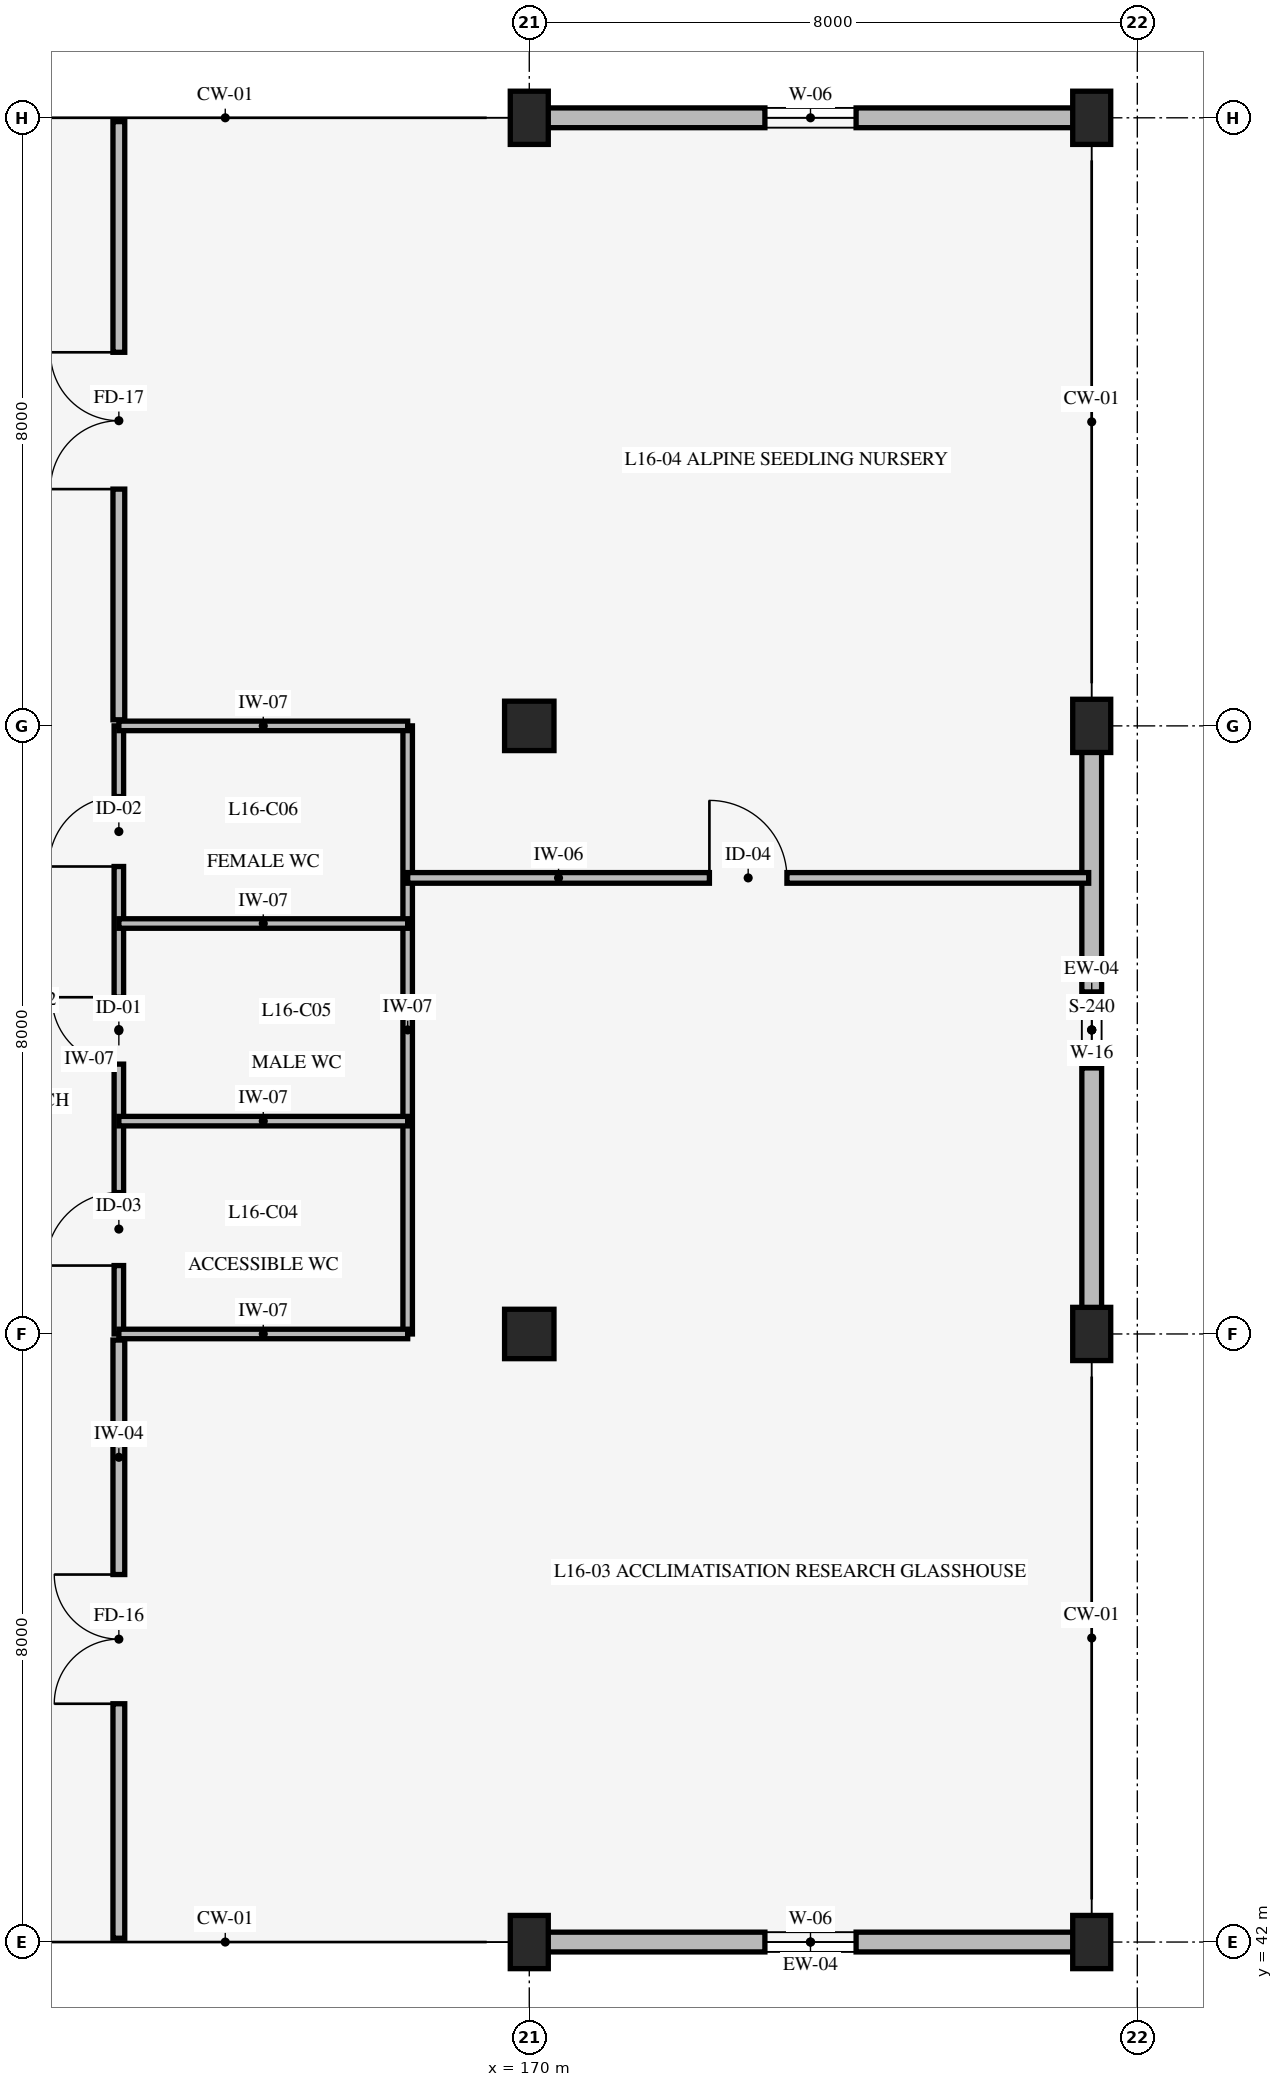
"""IFC4 building model, lengths in metres.
Left out: names, types, materials, properties, quantities, classifications, styles, units other than length and angle.
Written with IfcOpenShell. Run it as: python <this file> out.ifc"""

import sys

from ifc_helpers import new_model, si_unit, direction, frame, frame_2d, origin, origin_2d, place, context, subcontext, project, spatial, rectangle, extrude, element, fill, save


model = new_model("IFC4")
c1 = context("Model", 3, precision=1e-05, world=origin(), true_north=direction((0.0, 1.0)))
c2 = subcontext(c1, "Body", "Model", "MODEL_VIEW")
j1 = project(units=[si_unit("LENGTHUNIT", "METRE"), si_unit("PLANEANGLEUNIT", "RADIAN")], contexts=[c1])
p1 = place(None, origin())
s1 = spatial("IfcSite", under=j1, at=p1, CompositionType="ELEMENT")
p2 = place(p1, origin())
s2 = spatial("IfcBuilding", under=s1, at=p2, CompositionType="ELEMENT")
p3 = place(p2, frame((0.0, 0.0, 65.4)))
s3 = spatial("IfcBuildingStorey", under=s2, at=p3, CompositionType="ELEMENT", Elevation=65.4)
p4 = place(p3, frame((170.0, 42.0, 0.0), z_axis=(0.0, 0.0, 1.0), x_axis=(1.0, 0.0, 0.0)))
e1 = element("IfcColumn", 1, at=p4, inside=s3, PredefinedType="COLUMN", context=c2, shape_type="SweptSolid", body=[
    extrude(rectangle(XDim=0.5, YDim=0.7, at=origin_2d()), origin(), (0.0, 0.0, 1.0), 4.2),
])
for number, where, z_axis, x_axis in (
    (2, (170.0, 50.0, 0.0), (0.0, 0.0, 1.0), (1.0, 0.0, 0.0)),
    (3, (170.0, 58.0, 0.0), (0.0, 0.0, 1.0), (1.0, 0.0, 0.0)),
):
    element("IfcColumn", number, at=place(p3, frame(where, z_axis=z_axis, x_axis=x_axis)), inside=s3, PredefinedType="COLUMN", context=c2, shape_type="SweptSolid", body=[
        extrude(rectangle(XDim=0.65, YDim=0.65, at=origin_2d()), origin(), (0.0, 0.0, 1.0), 4.2),
    ])
for number, where, z_axis, x_axis in (
    (4, (170.0, 66.0, 0.0), (0.0, 0.0, 1.0), (1.0, 0.0, 0.0)),
    (5, (177.4, 42.0, 0.0), (0.0, 0.0, 1.0), (1.0, 0.0, 0.0)),
    (6, (177.4, 50.0, 0.0), (0.0, 0.0, 1.0), (1.0, 0.0, 0.0)),
    (7, (177.4, 58.0, 0.0), (0.0, 0.0, 1.0), (1.0, 0.0, 0.0)),
    (8, (177.4, 66.0, 0.0), (0.0, 0.0, 1.0), (1.0, 0.0, 0.0)),
):
    element("IfcColumn", number, at=place(p3, frame(where, z_axis=z_axis, x_axis=x_axis)), inside=s3, PredefinedType="COLUMN", context=c2, shape_type="SweptSolid", body=[
        extrude(rectangle(XDim=0.5, YDim=0.7, at=origin_2d()), origin(), (0.0, 0.0, 1.0), 4.2),
    ])
p5 = place(p3, frame((177.4, 42.0, 0.0), z_axis=(0.0, 0.0, 1.0), x_axis=(-1.0, 0.0, 0.0)))
e9 = element("IfcWall", 9, at=p5, inside=s3, PredefinedType="STANDARD", context=c2, shape_type="SweptSolid", body=[
    extrude(rectangle(XDim=7.4, YDim=0.26, at=frame_2d((3.7, 0.0))), origin(), (0.0, 0.0, 1.0), 3.24),
])
p6 = place(p5, frame((3.1, 0.0, 0.85)))
e10 = element("IfcOpeningElement", 10, at=p6, cuts=e9, PredefinedType="OPENING", context=c2, shape_type="SweptSolid", body=[
    extrude(rectangle(XDim=1.2, YDim=1.2, at=frame_2d((0.6, 0.6))), frame((0.0, 0.14, 0.0), z_axis=(0.0, -1.0, 0.0), x_axis=(1.0, 0.0, 0.0)), (0.0, 0.0, 1.0), 0.28),
])
p7 = place(p3, frame((170.0, 66.0, 0.0), z_axis=(0.0, 0.0, 1.0), x_axis=(1.0, 0.0, 0.0)))
e11 = element("IfcWall", 11, at=p7, inside=s3, PredefinedType="STANDARD", context=c2, shape_type="SweptSolid", body=[
    extrude(rectangle(XDim=7.4, YDim=0.26, at=frame_2d((3.7, 0.0))), origin(), (0.0, 0.0, 1.0), 3.24),
])
p8 = place(p7, frame((3.1, 0.0, 0.85)))
e12 = element("IfcOpeningElement", 12, at=p8, cuts=e11, PredefinedType="OPENING", context=c2, shape_type="SweptSolid", body=[
    extrude(rectangle(XDim=1.2, YDim=1.2, at=frame_2d((0.6, 0.6))), frame((0.0, 0.14, 0.0), z_axis=(0.0, -1.0, 0.0), x_axis=(1.0, 0.0, 0.0)), (0.0, 0.0, 1.0), 0.28),
])
p9 = place(p3, frame((177.4, 58.0, 0.0), z_axis=(0.0, 0.0, 1.0), x_axis=(0.0, -1.0, 0.0)))
e13 = element("IfcWall", 13, at=p9, inside=s3, PredefinedType="STANDARD", context=c2, shape_type="SweptSolid", body=[
    extrude(rectangle(XDim=8.0, YDim=0.26, at=frame_2d((4.0, 0.0))), origin(), (0.0, 0.0, 1.0), 3.29),
])
p10 = place(p9, frame((3.5, 0.0, 0.85)))
e14 = element("IfcOpeningElement", 14, at=p10, cuts=e13, PredefinedType="OPENING", context=c2, shape_type="SweptSolid", body=[
    extrude(rectangle(XDim=1.0, YDim=1.5, at=frame_2d((0.5, 0.75))), frame((0.0, 0.14, 0.0), z_axis=(0.0, -1.0, 0.0), x_axis=(1.0, 0.0, 0.0)), (0.0, 0.0, 1.0), 0.28),
])
p11 = place(p3, frame((164.6, 50.0, 0.0), z_axis=(0.0, 0.0, 1.0), x_axis=(0.0, 1.0, 0.0)))
e15 = element("IfcWall", 15, at=p11, inside=s3, PredefinedType="STANDARD", context=c2, shape_type="SweptSolid", body=[
    extrude(rectangle(XDim=8.0, YDim=0.125, at=frame_2d((4.0, 0.0))), origin(), (0.0, 0.0, 1.0), 3.9),
])
p12 = place(p11, frame((0.9, 0.0, 0.0)))
e16 = element("IfcOpeningElement", 16, at=p12, cuts=e15, PredefinedType="OPENING", context=c2, shape_type="SweptSolid", body=[
    extrude(rectangle(XDim=0.96, YDim=2.08, at=frame_2d((0.48, 1.04))), frame((0.0, 0.073, 0.0), z_axis=(0.0, -1.0, 0.0), x_axis=(1.0, 0.0, 0.0)), (0.0, 0.0, 1.0), 0.145),
])
p13 = place(p11, frame((3.55, 0.0, 0.0)))
e17 = element("IfcOpeningElement", 17, at=p13, cuts=e15, PredefinedType="OPENING", context=c2, shape_type="SweptSolid", body=[
    extrude(rectangle(XDim=0.88, YDim=2.05, at=frame_2d((0.44, 1.025))), frame((0.0, 0.073, 0.0), z_axis=(0.0, -1.0, 0.0), x_axis=(1.0, 0.0, 0.0)), (0.0, 0.0, 1.0), 0.145),
])
p14 = place(p11, frame((6.15, 0.0, 0.0)))
e18 = element("IfcOpeningElement", 18, at=p14, cuts=e15, PredefinedType="OPENING", context=c2, shape_type="SweptSolid", body=[
    extrude(rectangle(XDim=0.92, YDim=2.05, at=frame_2d((0.46, 1.025))), frame((0.0, 0.073, 0.0), z_axis=(0.0, -1.0, 0.0), x_axis=(1.0, 0.0, 0.0)), (0.0, 0.0, 1.0), 0.145),
])
p15 = place(p3, frame((168.4, 50.0, 0.0), z_axis=(0.0, 0.0, 1.0), x_axis=(0.0, 1.0, 0.0)))
e19 = element("IfcWall", 19, at=p15, inside=s3, PredefinedType="STANDARD", context=c2, shape_type="SweptSolid", body=[
    extrude(rectangle(XDim=8.0, YDim=0.125, at=frame_2d((4.0, 0.0))), origin(), (0.0, 0.0, 1.0), 3.9),
])
p16 = place(p3, frame((164.6, 50.0, 0.0), z_axis=(0.0, 0.0, 1.0), x_axis=(1.0, 0.0, 0.0)))
e20 = element("IfcWall", 20, at=p16, inside=s3, PredefinedType="STANDARD", context=c2, shape_type="SweptSolid", body=[
    extrude(rectangle(XDim=3.8, YDim=0.125, at=frame_2d((1.9, 0.0))), origin(), (0.0, 0.0, 1.0), 3.24),
])
for number, where, z_axis, x_axis in (
    (21, (164.6, 52.8, 0.0), (0.0, 0.0, 1.0), (1.0, 0.0, 0.0)),
    (22, (164.6, 55.4, 0.0), (0.0, 0.0, 1.0), (1.0, 0.0, 0.0)),
):
    element("IfcWall", number, at=place(p3, frame(where, z_axis=z_axis, x_axis=x_axis)), inside=s3, PredefinedType="STANDARD", context=c2, shape_type="SweptSolid", body=[
        extrude(rectangle(XDim=3.8, YDim=0.125, at=frame_2d((1.9, 0.0))), origin(), (0.0, 0.0, 1.0), 3.9),
    ])
p17 = place(p3, frame((164.6, 58.0, 0.0), z_axis=(0.0, 0.0, 1.0), x_axis=(1.0, 0.0, 0.0)))
e23 = element("IfcWall", 23, at=p17, inside=s3, PredefinedType="STANDARD", context=c2, shape_type="SweptSolid", body=[
    extrude(rectangle(XDim=3.8, YDim=0.125, at=frame_2d((1.9, 0.0))), origin(), (0.0, 0.0, 1.0), 3.24),
])
p18 = place(p3, frame((164.6, 42.05, 0.0), z_axis=(0.0, 0.0, 1.0), x_axis=(0.0, 1.0, 0.0)))
e24 = element("IfcWall", 24, at=p18, inside=s3, PredefinedType="STANDARD", context=c2, shape_type="SweptSolid", body=[
    extrude(rectangle(XDim=7.87, YDim=0.155, at=frame_2d((3.935, 0.0))), origin(), (0.0, 0.0, 1.0), 3.9),
])
p19 = place(p18, frame((3.085, 0.0, 0.0)))
e25 = element("IfcOpeningElement", 25, at=p19, cuts=e24, PredefinedType="OPENING", context=c2, shape_type="SweptSolid", body=[
    extrude(rectangle(XDim=1.7, YDim=2.3, at=frame_2d((0.85, 1.15))), frame((0.0, 0.087, 0.0), z_axis=(0.0, -1.0, 0.0), x_axis=(1.0, 0.0, 0.0)), (0.0, 0.0, 1.0), 0.175),
])
p20 = place(p3, frame((168.4, 56.0, 0.0), z_axis=(0.0, 0.0, 1.0), x_axis=(1.0, 0.0, 0.0)))
e26 = element("IfcWall", 26, at=p20, inside=s3, PredefinedType="STANDARD", context=c2, shape_type="SweptSolid", body=[
    extrude(rectangle(XDim=8.96, YDim=0.14, at=frame_2d((4.48, 0.0))), origin(), (0.0, 0.0, 1.0), 3.9),
])
p21 = place(p20, frame((3.97, 0.0, 0.0)))
e27 = element("IfcOpeningElement", 27, at=p21, cuts=e26, PredefinedType="OPENING", context=c2, shape_type="SweptSolid", body=[
    extrude(rectangle(XDim=1.02, YDim=2.08, at=frame_2d((0.51, 1.04))), frame((0.0, 0.08, 0.0), z_axis=(0.0, -1.0, 0.0), x_axis=(1.0, 0.0, 0.0)), (0.0, 0.0, 1.0), 0.16),
])
p22 = place(p3, frame((164.6, 58.08, 0.0), z_axis=(0.0, 0.0, 1.0), x_axis=(0.0, 1.0, 0.0)))
e28 = element("IfcWall", 28, at=p22, inside=s3, PredefinedType="STANDARD", context=c2, shape_type="SweptSolid", body=[
    extrude(rectangle(XDim=7.87, YDim=0.155, at=frame_2d((3.935, 0.0))), origin(), (0.0, 0.0, 1.0), 3.9),
])
p23 = place(p22, frame((3.035, 0.0, 0.0)))
e29 = element("IfcOpeningElement", 29, at=p23, cuts=e28, PredefinedType="OPENING", context=c2, shape_type="SweptSolid", body=[
    extrude(rectangle(XDim=1.8, YDim=2.3, at=frame_2d((0.9, 1.15))), frame((0.0, 0.087, 0.0), z_axis=(0.0, -1.0, 0.0), x_axis=(1.0, 0.0, 0.0)), (0.0, 0.0, 1.0), 0.175),
])
p24 = place(p6, origin())
e30 = element("IfcWindow", 30, at=p24, inside=s3, PartitioningType="SINGLE_PANEL", PredefinedType="WINDOW", context=c2, shape_type="SweptSolid", body=[
    extrude(rectangle(XDim=1.2, YDim=1.2, at=frame_2d((0.6, 0.6))), frame((0.0, 0.03, 0.0), z_axis=(0.0, -1.0, 0.0), x_axis=(1.0, 0.0, 0.0)), (0.0, 0.0, 1.0), 0.06),
])
fill(e10, e30)
p25 = place(p8, origin())
e31 = element("IfcWindow", 31, at=p25, inside=s3, PartitioningType="SINGLE_PANEL", PredefinedType="WINDOW", context=c2, shape_type="SweptSolid", body=[
    extrude(rectangle(XDim=1.2, YDim=1.2, at=frame_2d((0.6, 0.6))), frame((0.0, 0.03, 0.0), z_axis=(0.0, -1.0, 0.0), x_axis=(1.0, 0.0, 0.0)), (0.0, 0.0, 1.0), 0.06),
])
fill(e12, e31)
p26 = place(p10, origin())
e32 = element("IfcWindow", 32, at=p26, inside=s3, PartitioningType="SINGLE_PANEL", PredefinedType="WINDOW", context=c2, shape_type="SweptSolid", body=[
    extrude(rectangle(XDim=1.0, YDim=1.5, at=frame_2d((0.5, 0.75))), frame((0.0, 0.03, 0.0), z_axis=(0.0, -1.0, 0.0), x_axis=(1.0, 0.0, 0.0)), (0.0, 0.0, 1.0), 0.06),
])
fill(e14, e32)
p27 = place(p12, origin())
e33 = element("IfcDoor", 33, at=p27, inside=s3, OperationType="SINGLE_SWING_LEFT", PredefinedType="DOOR", context=c2, shape_type="SweptSolid", body=[
    extrude(rectangle(XDim=0.96, YDim=2.08, at=frame_2d((0.48, 1.04))), frame((0.0, 0.025, 0.0), z_axis=(0.0, -1.0, 0.0), x_axis=(1.0, 0.0, 0.0)), (0.0, 0.0, 1.0), 0.05),
])
fill(e16, e33)
p28 = place(p13, origin())
e34 = element("IfcDoor", 34, at=p28, inside=s3, OperationType="SINGLE_SWING_RIGHT", PredefinedType="DOOR", context=c2, shape_type="SweptSolid", body=[
    extrude(rectangle(XDim=0.88, YDim=2.05, at=frame_2d((0.44, 1.025))), frame((0.0, 0.025, 0.0), z_axis=(0.0, -1.0, 0.0), x_axis=(1.0, 0.0, 0.0)), (0.0, 0.0, 1.0), 0.05),
])
fill(e17, e34)
p29 = place(p14, origin())
e35 = element("IfcDoor", 35, at=p29, inside=s3, OperationType="SINGLE_SWING_LEFT", PredefinedType="DOOR", context=c2, shape_type="SweptSolid", body=[
    extrude(rectangle(XDim=0.92, YDim=2.05, at=frame_2d((0.46, 1.025))), frame((0.0, 0.025, 0.0), z_axis=(0.0, -1.0, 0.0), x_axis=(1.0, 0.0, 0.0)), (0.0, 0.0, 1.0), 0.05),
])
fill(e18, e35)
p30 = place(p19, origin())
e36 = element("IfcDoor", 36, at=p30, inside=s3, OperationType="DOUBLE_DOOR_SINGLE_SWING", PredefinedType="DOOR", context=c2, shape_type="SweptSolid", body=[
    extrude(rectangle(XDim=1.7, YDim=2.3, at=frame_2d((0.85, 1.15))), frame((0.0, 0.025, 0.0), z_axis=(0.0, -1.0, 0.0), x_axis=(1.0, 0.0, 0.0)), (0.0, 0.0, 1.0), 0.05),
])
fill(e25, e36)
p31 = place(p21, origin())
e37 = element("IfcDoor", 37, at=p31, inside=s3, OperationType="SINGLE_SWING_LEFT", PredefinedType="DOOR", context=c2, shape_type="SweptSolid", body=[
    extrude(rectangle(XDim=1.02, YDim=2.08, at=frame_2d((0.51, 1.04))), frame((0.0, 0.025, 0.0), z_axis=(0.0, -1.0, 0.0), x_axis=(1.0, 0.0, 0.0)), (0.0, 0.0, 1.0), 0.05),
])
fill(e27, e37)
p32 = place(p23, origin())
e38 = element("IfcDoor", 38, at=p32, inside=s3, OperationType="DOUBLE_DOOR_SINGLE_SWING", PredefinedType="DOOR", context=c2, shape_type="SweptSolid", body=[
    extrude(rectangle(XDim=1.8, YDim=2.3, at=frame_2d((0.9, 1.15))), frame((0.0, 0.025, 0.0), z_axis=(0.0, -1.0, 0.0), x_axis=(1.0, 0.0, 0.0)), (0.0, 0.0, 1.0), 0.05),
])
fill(e29, e38)
save(model, sys.argv[1])
